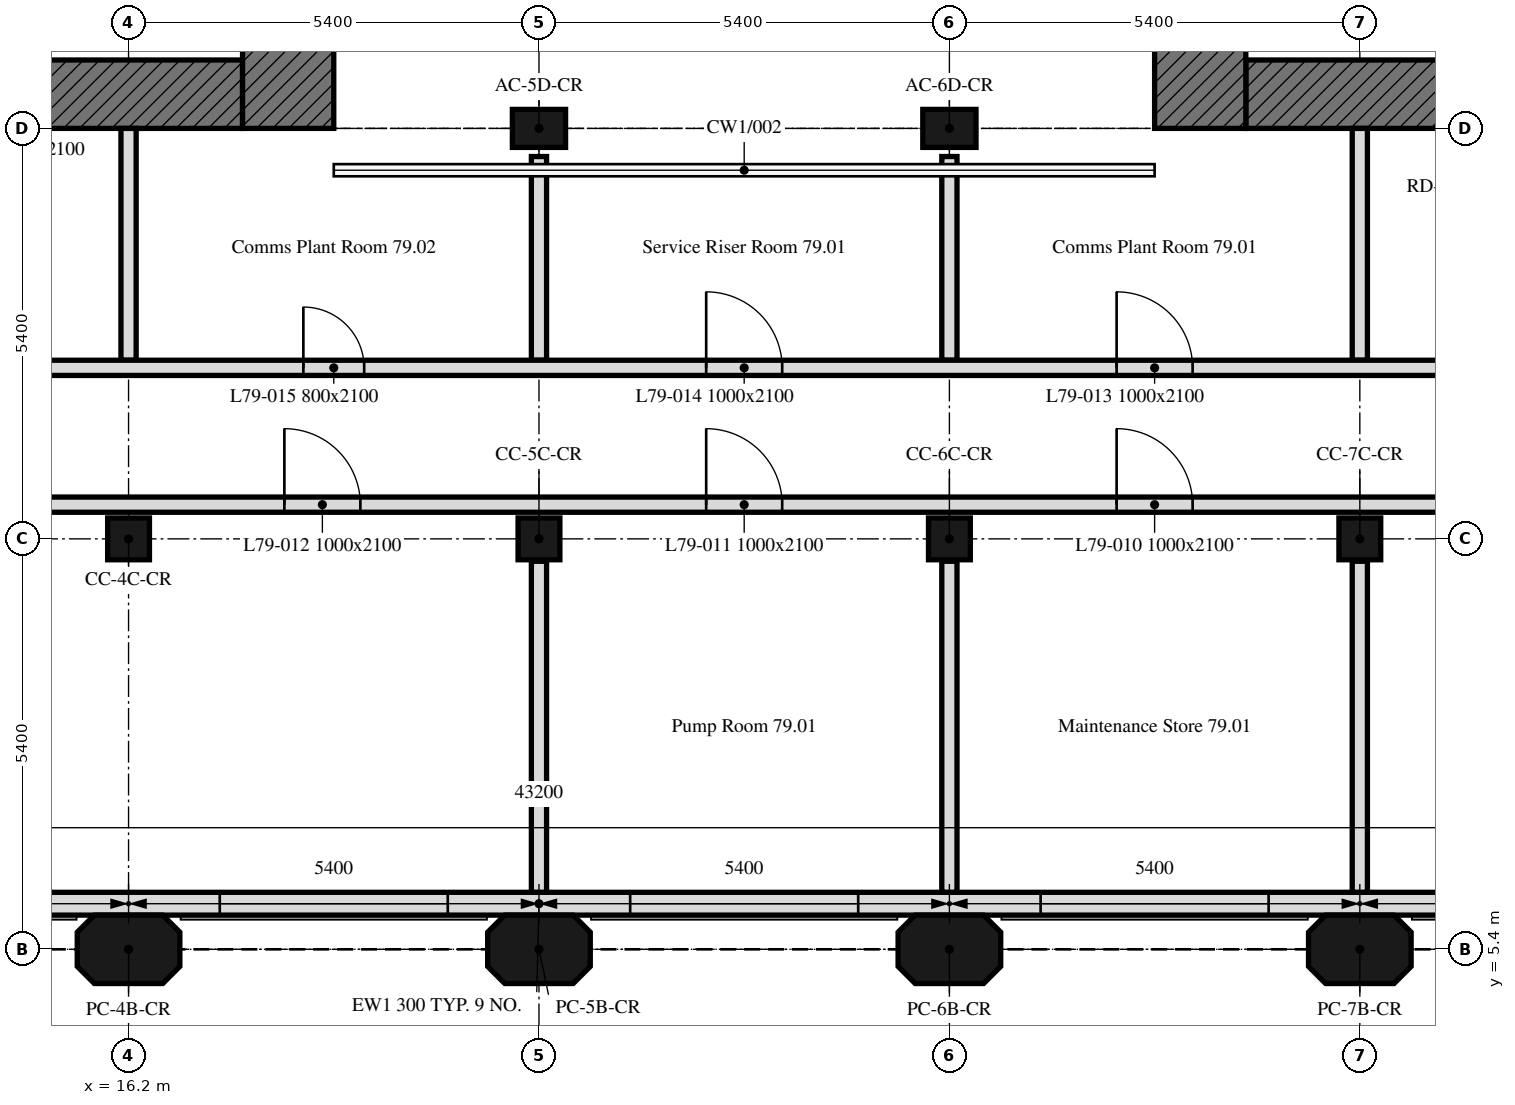
"""IFC4 building model, lengths in metres.
Left out: names, types, materials, properties, quantities, classifications, styles, units other than length and angle.
Written with IfcOpenShell. Run it as: python <this file> out.ifc"""

import sys

from ifc_helpers import new_model, si_unit, direction, frame, frame_2d, origin, origin_2d, place, context, subcontext, project, spatial, polyline, rectangle, outline, extrude, element, fill, save


model = new_model("IFC4")
c1 = context("Model", 3, precision=1e-05, world=origin(), true_north=direction((0.0, 1.0)))
c2 = subcontext(c1, "Body", "Model", "MODEL_VIEW")
j1 = project(units=[si_unit("LENGTHUNIT", "METRE"), si_unit("PLANEANGLEUNIT", "RADIAN")], contexts=[c1])
p1 = place(None, origin())
s1 = spatial("IfcSite", under=j1, at=p1, CompositionType="ELEMENT")
p2 = place(p1, origin())
s2 = spatial("IfcBuilding", under=s1, at=p2, CompositionType="ELEMENT")
p3 = place(p2, frame((0.0, 0.0, 317.2)))
s3 = spatial("IfcBuildingStorey", under=s2, at=p3, CompositionType="ELEMENT", Elevation=317.2)
for number, where, z_axis, x_axis in (
    (1, (16.2, 5.4, 0.0), (0.0, 0.0, 1.0), (1.0, 0.0, 0.0)),
    (2, (21.6, 5.4, 0.0), (0.0, 0.0, 1.0), (1.0, 0.0, 0.0)),
    (3, (27.0, 5.4, 0.0), (0.0, 0.0, 1.0), (1.0, 0.0, 0.0)),
    (4, (32.4, 5.4, 0.0), (0.0, 0.0, 1.0), (1.0, 0.0, 0.0)),
):
    element("IfcColumn", number, at=place(p3, frame(where, z_axis=z_axis, x_axis=x_axis)), inside=s3, PredefinedType="COLUMN", context=c2, shape_type="SweptSolid", body=[
        extrude(outline(polyline([(-0.45, -0.45), (0.45, -0.45), (0.675, -0.225), (0.675, 0.225), (0.45, 0.45), (-0.45, 0.45), (-0.675, 0.225), (-0.675, -0.225), (-0.45, -0.45)])), origin(), (0.0, 0.0, 1.0), 4.2),
    ])
for number, where, z_axis, x_axis in (
    (5, (16.2, 10.8, 0.0), (0.0, 0.0, 1.0), (1.0, 0.0, 0.0)),
    (6, (21.6, 10.8, 0.0), (0.0, 0.0, 1.0), (1.0, 0.0, 0.0)),
    (7, (27.0, 10.8, 0.0), (0.0, 0.0, 1.0), (1.0, 0.0, 0.0)),
    (8, (32.4, 10.8, 0.0), (0.0, 0.0, 1.0), (1.0, 0.0, 0.0)),
):
    element("IfcColumn", number, at=place(p3, frame(where, z_axis=z_axis, x_axis=x_axis)), inside=s3, PredefinedType="COLUMN", context=c2, shape_type="SweptSolid", body=[
        extrude(rectangle(XDim=0.55, YDim=0.55, at=origin_2d()), origin(), (0.0, 0.0, 1.0), 4.2),
    ])
for number, where, z_axis, x_axis in (
    (9, (21.6, 16.2, 0.0), (0.0, 0.0, 1.0), (1.0, 0.0, 0.0)),
    (10, (27.0, 16.2, 0.0), (0.0, 0.0, 1.0), (1.0, 0.0, 0.0)),
):
    element("IfcColumn", number, at=place(p3, frame(where, z_axis=z_axis, x_axis=x_axis)), inside=s3, PredefinedType="COLUMN", context=c2, shape_type="SweptSolid", body=[
        extrude(rectangle(XDim=0.7, YDim=0.5, at=origin_2d()), origin(), (0.0, 0.0, 1.0), 4.2),
    ])
p4 = place(p3, frame((5.586, 6.0, 0.0), z_axis=(0.0, 0.0, 1.0), x_axis=(1.0, 0.0, 0.0)))
e11 = element("IfcWall", 11, at=p4, inside=s3, PredefinedType="SOLIDWALL", context=c2, shape_type="SweptSolid", body=[
    extrude(outline(polyline([(0.0, 0.0), (32.027, 0.0), (32.027, 4.2), (31.434, 4.2), (30.841, 4.2), (30.248, 4.2), (29.655, 4.2), (29.062, 4.2), (28.469, 4.2), (27.875, 4.2), (27.282, 4.2), (26.689, 4.2), (26.096, 4.2), (25.503, 4.2), (24.91, 4.2), (24.317, 4.2), (23.724, 4.2), (23.131, 4.2), (22.538, 4.2), (21.945, 4.2), (21.352, 4.2), (20.758, 4.2), (20.165, 4.2), (19.572, 4.2), (18.979, 4.2), (18.386, 4.2), (17.793, 4.2), (17.2, 4.2), (16.607, 4.2), (16.014, 4.2), (15.42, 4.2), (14.827, 4.2), (14.234, 4.2), (13.641, 4.2), (13.048, 4.2), (12.455, 4.2), (11.862, 4.2), (11.269, 4.2), (10.676, 4.2), (10.083, 4.2), (9.49, 4.2), (8.896, 4.2), (8.303, 4.2), (7.71, 4.2), (7.117, 4.2), (6.524, 4.2), (5.931, 4.2), (5.338, 4.2), (4.745, 4.2), (4.152, 4.2), (3.559, 4.2), (2.966, 4.2), (2.372, 4.2), (1.779, 4.2), (1.186, 4.2), (0.593, 4.2), (0.0, 4.2), (0.0, 0.0)])), frame((0.0, 0.15, 0.0), z_axis=(0.0, -1.0, 0.0), x_axis=(1.0, 0.0, 0.0)), (0.0, 0.0, 1.0), 0.3),
])
p5 = place(p4, frame((1.014, 0.0, 0.6)))
e12 = element("IfcOpeningElement", 12, at=p5, cuts=e11, PredefinedType="OPENING", context=c2, shape_type="SweptSolid", body=[
    extrude(rectangle(XDim=3.0, YDim=1.8, at=frame_2d((1.5, 0.9))), frame((0.0, 0.16, 0.0), z_axis=(0.0, -1.0, 0.0), x_axis=(1.0, 0.0, 0.0)), (0.0, 0.0, 1.0), 0.32),
])
p6 = place(p4, frame((6.414, 0.0, 0.6)))
e13 = element("IfcOpeningElement", 13, at=p6, cuts=e11, PredefinedType="OPENING", context=c2, shape_type="SweptSolid", body=[
    extrude(rectangle(XDim=3.0, YDim=1.8, at=frame_2d((1.5, 0.9))), frame((0.0, 0.16, 0.0), z_axis=(0.0, -1.0, 0.0), x_axis=(1.0, 0.0, 0.0)), (0.0, 0.0, 1.0), 0.32),
])
p7 = place(p4, frame((11.814, 0.0, 0.6)))
e14 = element("IfcOpeningElement", 14, at=p7, cuts=e11, PredefinedType="OPENING", context=c2, shape_type="SweptSolid", body=[
    extrude(rectangle(XDim=3.0, YDim=1.8, at=frame_2d((1.5, 0.9))), frame((0.0, 0.16, 0.0), z_axis=(0.0, -1.0, 0.0), x_axis=(1.0, 0.0, 0.0)), (0.0, 0.0, 1.0), 0.32),
])
p8 = place(p4, frame((17.214, 0.0, 0.6)))
e15 = element("IfcOpeningElement", 15, at=p8, cuts=e11, PredefinedType="OPENING", context=c2, shape_type="SweptSolid", body=[
    extrude(rectangle(XDim=3.0, YDim=1.8, at=frame_2d((1.5, 0.9))), frame((0.0, 0.16, 0.0), z_axis=(0.0, -1.0, 0.0), x_axis=(1.0, 0.0, 0.0)), (0.0, 0.0, 1.0), 0.32),
])
p9 = place(p4, frame((22.614, 0.0, 0.6)))
e16 = element("IfcOpeningElement", 16, at=p9, cuts=e11, PredefinedType="OPENING", context=c2, shape_type="SweptSolid", body=[
    extrude(rectangle(XDim=3.0, YDim=1.8, at=frame_2d((1.5, 0.9))), frame((0.0, 0.16, 0.0), z_axis=(0.0, -1.0, 0.0), x_axis=(1.0, 0.0, 0.0)), (0.0, 0.0, 1.0), 0.32),
])
p10 = place(p4, frame((28.014, 0.0, 0.6)))
e17 = element("IfcOpeningElement", 17, at=p10, cuts=e11, PredefinedType="OPENING", context=c2, shape_type="SweptSolid", body=[
    extrude(rectangle(XDim=3.0, YDim=1.8, at=frame_2d((1.5, 0.9))), frame((0.0, 0.16, 0.0), z_axis=(0.0, -1.0, 0.0), x_axis=(1.0, 0.0, 0.0)), (0.0, 0.0, 1.0), 0.32),
])
p11 = place(p3, frame((17.7, 16.65, 0.0), z_axis=(0.0, 0.0, 1.0), x_axis=(-1.0, 0.0, 0.0)))
e18 = element("IfcWall", 18, at=p11, inside=s3, PredefinedType="SOLIDWALL", context=c2, shape_type="SweptSolid", body=[
    extrude(rectangle(XDim=11.1, YDim=0.9, at=frame_2d((5.55, 0.0))), origin(), (0.0, 0.0, 1.0), 4.2),
])
p12 = place(p11, frame((5.55, 0.0, 0.0)))
e19 = element("IfcOpeningElement", 19, at=p12, cuts=e18, PredefinedType="OPENING", context=c2, shape_type="SweptSolid", body=[
    extrude(rectangle(XDim=2.0, YDim=2.4, at=frame_2d((1.0, 1.2))), frame((0.0, 0.45, 0.0), z_axis=(0.0, -1.0, 0.0), x_axis=(1.0, 0.0, 0.0)), (0.0, 0.0, 1.0), 0.9),
])
p13 = place(p3, frame((18.3, 32.4, 0.0), z_axis=(0.0, 0.0, 1.0), x_axis=(0.0, -1.0, 0.0)))
e20 = element("IfcWall", 20, at=p13, inside=s3, PredefinedType="SOLIDWALL", context=c2, shape_type="SweptSolid", body=[
    extrude(rectangle(XDim=16.2, YDim=1.2, at=frame_2d((8.1, 0.0))), origin(), (0.0, 0.0, 1.0), 4.2),
])
p14 = place(p3, frame((42.0, 16.65, 0.0), z_axis=(0.0, 0.0, 1.0), x_axis=(-1.0, 0.0, 0.0)))
e21 = element("IfcWall", 21, at=p14, inside=s3, PredefinedType="SOLIDWALL", context=c2, shape_type="SweptSolid", body=[
    extrude(rectangle(XDim=11.1, YDim=0.9, at=frame_2d((5.55, 0.0))), origin(), (0.0, 0.0, 1.0), 4.2),
])
p15 = place(p14, frame((3.55, 0.0, 0.0)))
e22 = element("IfcOpeningElement", 22, at=p15, cuts=e21, PredefinedType="OPENING", context=c2, shape_type="SweptSolid", body=[
    extrude(rectangle(XDim=2.0, YDim=2.4, at=frame_2d((1.0, 1.2))), frame((0.0, 0.45, 0.0), z_axis=(0.0, -1.0, 0.0), x_axis=(1.0, 0.0, 0.0)), (0.0, 0.0, 1.0), 0.9),
])
p16 = place(p3, frame((30.3, 16.2, 0.0), z_axis=(0.0, 0.0, 1.0), x_axis=(0.0, 1.0, 0.0)))
e23 = element("IfcWall", 23, at=p16, inside=s3, PredefinedType="SOLIDWALL", context=c2, shape_type="SweptSolid", body=[
    extrude(rectangle(XDim=16.2, YDim=1.2, at=frame_2d((8.1, 0.0))), origin(), (0.0, 0.0, 1.0), 4.2),
])
for number, where, z_axis, x_axis in (
    (24, (32.4, 10.505, 0.0), (0.0, 0.0, 1.0), (0.0, -1.0, 0.0)),
    (25, (27.0, 10.505, 0.0), (0.0, 0.0, 1.0), (0.0, -1.0, 0.0)),
    (26, (21.6, 10.505, 0.0), (0.0, 0.0, 1.0), (0.0, -1.0, 0.0)),
):
    element("IfcWall", number, at=place(p3, frame(where, z_axis=z_axis, x_axis=x_axis)), inside=s3, PredefinedType="PARTITIONING", context=c2, shape_type="SweptSolid", body=[
        extrude(rectangle(XDim=4.354, YDim=0.2, at=frame_2d((2.177, 0.0))), origin(), (0.0, 0.0, 1.0), 4.2),
    ])
p17 = place(p3, frame((0.751, 11.25, 0.0), z_axis=(0.0, 0.0, 1.0), x_axis=(1.0, 0.0, 0.0)))
e27 = element("IfcWall", 27, at=p17, inside=s3, PredefinedType="PARTITIONING", context=c2, shape_type="SweptSolid", body=[
    extrude(rectangle(XDim=41.698, YDim=0.2, at=frame_2d((20.849, 0.0))), origin(), (0.0, 0.0, 1.0), 4.2),
])
p18 = place(p17, frame((33.866, 0.0, 0.0)))
e28 = element("IfcOpeningElement", 28, at=p18, cuts=e27, PredefinedType="OPENING", context=c2, shape_type="SweptSolid", body=[
    extrude(rectangle(XDim=1.0, YDim=2.1, at=frame_2d((0.5, 1.05))), frame((0.0, 0.1, 0.0), z_axis=(0.0, -1.0, 0.0), x_axis=(1.0, 0.0, 0.0)), (0.0, 0.0, 1.0), 0.2),
])
p19 = place(p17, frame((28.449, 0.0, 0.0)))
e29 = element("IfcOpeningElement", 29, at=p19, cuts=e27, PredefinedType="OPENING", context=c2, shape_type="SweptSolid", body=[
    extrude(rectangle(XDim=1.0, YDim=2.1, at=frame_2d((0.5, 1.05))), frame((0.0, 0.1, 0.0), z_axis=(0.0, -1.0, 0.0), x_axis=(1.0, 0.0, 0.0)), (0.0, 0.0, 1.0), 0.2),
])
p20 = place(p17, frame((23.049, 0.0, 0.0)))
e30 = element("IfcOpeningElement", 30, at=p20, cuts=e27, PredefinedType="OPENING", context=c2, shape_type="SweptSolid", body=[
    extrude(rectangle(XDim=1.0, YDim=2.1, at=frame_2d((0.5, 1.05))), frame((0.0, 0.1, 0.0), z_axis=(0.0, -1.0, 0.0), x_axis=(1.0, 0.0, 0.0)), (0.0, 0.0, 1.0), 0.2),
])
p21 = place(p17, frame((17.499, 0.0, 0.0)))
e31 = element("IfcOpeningElement", 31, at=p21, cuts=e27, PredefinedType="OPENING", context=c2, shape_type="SweptSolid", body=[
    extrude(rectangle(XDim=1.0, YDim=2.1, at=frame_2d((0.5, 1.05))), frame((0.0, 0.1, 0.0), z_axis=(0.0, -1.0, 0.0), x_axis=(1.0, 0.0, 0.0)), (0.0, 0.0, 1.0), 0.2),
])
p22 = place(p3, frame((27.0, 15.83, 0.0), z_axis=(0.0, 0.0, 1.0), x_axis=(0.0, -1.0, 0.0)))
e32 = element("IfcWall", 32, at=p22, inside=s3, PredefinedType="PARTITIONING", context=c2, shape_type="SweptSolid", body=[
    extrude(rectangle(XDim=2.68, YDim=0.2, at=frame_2d((1.34, 0.0))), origin(), (0.0, 0.0, 1.0), 4.2),
])
p23 = place(p3, frame((32.4, 13.15, 0.0), z_axis=(0.0, 0.0, 1.0), x_axis=(0.0, 1.0, 0.0)))
e33 = element("IfcWall", 33, at=p23, inside=s3, PredefinedType="PARTITIONING", context=c2, shape_type="SweptSolid", body=[
    extrude(rectangle(XDim=3.05, YDim=0.2, at=frame_2d((1.525, 0.0))), origin(), (0.0, 0.0, 1.0), 4.2),
])
p24 = place(p3, frame((21.6, 15.83, 0.0), z_axis=(0.0, 0.0, 1.0), x_axis=(0.0, -1.0, 0.0)))
e34 = element("IfcWall", 34, at=p24, inside=s3, PredefinedType="PARTITIONING", context=c2, shape_type="SweptSolid", body=[
    extrude(rectangle(XDim=2.68, YDim=0.2, at=frame_2d((1.34, 0.0))), origin(), (0.0, 0.0, 1.0), 4.2),
])
p25 = place(p3, frame((16.2, 16.2, 0.0), z_axis=(0.0, 0.0, 1.0), x_axis=(0.0, -1.0, 0.0)))
e35 = element("IfcWall", 35, at=p25, inside=s3, PredefinedType="PARTITIONING", context=c2, shape_type="SweptSolid", body=[
    extrude(rectangle(XDim=3.05, YDim=0.2, at=frame_2d((1.525, 0.0))), origin(), (0.0, 0.0, 1.0), 4.2),
])
p26 = place(p3, frame((5.3, 13.05, 0.0), z_axis=(0.0, 0.0, 1.0), x_axis=(1.0, 0.0, 0.0)))
e36 = element("IfcWall", 36, at=p26, inside=s3, PredefinedType="PARTITIONING", context=c2, shape_type="SweptSolid", body=[
    extrude(rectangle(XDim=36.049, YDim=0.2, at=frame_2d((18.024, 0.0))), origin(), (0.0, 0.0, 1.0), 4.2),
])
p27 = place(p26, frame((23.9, 0.0, 0.0)))
e37 = element("IfcOpeningElement", 37, at=p27, cuts=e36, PredefinedType="OPENING", context=c2, shape_type="SweptSolid", body=[
    extrude(rectangle(XDim=1.0, YDim=2.1, at=frame_2d((0.5, 1.05))), frame((0.0, 0.1, 0.0), z_axis=(0.0, -1.0, 0.0), x_axis=(1.0, 0.0, 0.0)), (0.0, 0.0, 1.0), 0.2),
])
p28 = place(p26, frame((18.5, 0.0, 0.0)))
e38 = element("IfcOpeningElement", 38, at=p28, cuts=e36, PredefinedType="OPENING", context=c2, shape_type="SweptSolid", body=[
    extrude(rectangle(XDim=1.0, YDim=2.1, at=frame_2d((0.5, 1.05))), frame((0.0, 0.1, 0.0), z_axis=(0.0, -1.0, 0.0), x_axis=(1.0, 0.0, 0.0)), (0.0, 0.0, 1.0), 0.2),
])
p29 = place(p26, frame((13.2, 0.0, 0.0)))
e39 = element("IfcOpeningElement", 39, at=p29, cuts=e36, PredefinedType="OPENING", context=c2, shape_type="SweptSolid", body=[
    extrude(rectangle(XDim=0.8, YDim=2.1, at=frame_2d((0.4, 1.05))), frame((0.0, 0.1, 0.0), z_axis=(0.0, -1.0, 0.0), x_axis=(1.0, 0.0, 0.0)), (0.0, 0.0, 1.0), 0.2),
])
p30 = place(p26, frame((29.5, 0.0, 0.0)))
e40 = element("IfcOpeningElement", 40, at=p30, cuts=e36, PredefinedType="OPENING", context=c2, shape_type="SweptSolid", body=[
    extrude(rectangle(XDim=1.8, YDim=2.4, at=frame_2d((0.9, 1.2))), frame((0.0, 0.1, 0.0), z_axis=(0.0, -1.0, 0.0), x_axis=(1.0, 0.0, 0.0)), (0.0, 0.0, 1.0), 0.2),
])
p31 = place(p26, frame((2.5, 0.0, 0.0)))
e41 = element("IfcOpeningElement", 41, at=p31, cuts=e36, PredefinedType="OPENING", context=c2, shape_type="SweptSolid", body=[
    extrude(rectangle(XDim=1.8, YDim=2.4, at=frame_2d((0.9, 1.2))), frame((0.0, 0.1, 0.0), z_axis=(0.0, -1.0, 0.0), x_axis=(1.0, 0.0, 0.0)), (0.0, 0.0, 1.0), 0.2),
])
p32 = place(p7, origin())
e42 = element("IfcWindow", 42, at=p32, inside=s3, PartitioningType="SINGLE_PANEL", PredefinedType="WINDOW", context=c2, shape_type="SweptSolid", body=[
    extrude(rectangle(XDim=3.0, YDim=1.8, at=frame_2d((1.5, 0.9))), frame((0.0, 0.03, 0.0), z_axis=(0.0, -1.0, 0.0), x_axis=(1.0, 0.0, 0.0)), (0.0, 0.0, 1.0), 0.06),
])
fill(e14, e42)
p33 = place(p8, origin())
e43 = element("IfcWindow", 43, at=p33, inside=s3, PartitioningType="SINGLE_PANEL", PredefinedType="WINDOW", context=c2, shape_type="SweptSolid", body=[
    extrude(rectangle(XDim=3.0, YDim=1.8, at=frame_2d((1.5, 0.9))), frame((0.0, 0.03, 0.0), z_axis=(0.0, -1.0, 0.0), x_axis=(1.0, 0.0, 0.0)), (0.0, 0.0, 1.0), 0.06),
])
fill(e15, e43)
p34 = place(p9, origin())
e44 = element("IfcWindow", 44, at=p34, inside=s3, PartitioningType="SINGLE_PANEL", PredefinedType="WINDOW", context=c2, shape_type="SweptSolid", body=[
    extrude(rectangle(XDim=3.0, YDim=1.8, at=frame_2d((1.5, 0.9))), frame((0.0, 0.03, 0.0), z_axis=(0.0, -1.0, 0.0), x_axis=(1.0, 0.0, 0.0)), (0.0, 0.0, 1.0), 0.06),
])
fill(e16, e44)
p35 = place(p19, origin())
e45 = element("IfcDoor", 45, at=p35, inside=s3, OperationType="SINGLE_SWING_LEFT", PredefinedType="DOOR", context=c2, shape_type="SweptSolid", body=[
    extrude(rectangle(XDim=1.0, YDim=2.1, at=frame_2d((0.5, 1.05))), frame((0.0, 0.025, 0.0), z_axis=(0.0, -1.0, 0.0), x_axis=(1.0, 0.0, 0.0)), (0.0, 0.0, 1.0), 0.05),
])
fill(e29, e45)
p36 = place(p20, origin())
e46 = element("IfcDoor", 46, at=p36, inside=s3, OperationType="SINGLE_SWING_LEFT", PredefinedType="DOOR", context=c2, shape_type="SweptSolid", body=[
    extrude(rectangle(XDim=1.0, YDim=2.1, at=frame_2d((0.5, 1.05))), frame((0.0, 0.025, 0.0), z_axis=(0.0, -1.0, 0.0), x_axis=(1.0, 0.0, 0.0)), (0.0, 0.0, 1.0), 0.05),
])
fill(e30, e46)
p37 = place(p21, origin())
e47 = element("IfcDoor", 47, at=p37, inside=s3, OperationType="SINGLE_SWING_RIGHT", PredefinedType="DOOR", context=c2, shape_type="SweptSolid", body=[
    extrude(rectangle(XDim=1.0, YDim=2.1, at=frame_2d((0.5, 1.05))), frame((0.0, 0.025, 0.0), z_axis=(0.0, -1.0, 0.0), x_axis=(1.0, 0.0, 0.0)), (0.0, 0.0, 1.0), 0.05),
])
fill(e31, e47)
p38 = place(p27, origin())
e48 = element("IfcDoor", 48, at=p38, inside=s3, OperationType="SINGLE_SWING_RIGHT", PredefinedType="DOOR", context=c2, shape_type="SweptSolid", body=[
    extrude(rectangle(XDim=1.0, YDim=2.1, at=frame_2d((0.5, 1.05))), frame((0.0, 0.025, 0.0), z_axis=(0.0, -1.0, 0.0), x_axis=(1.0, 0.0, 0.0)), (0.0, 0.0, 1.0), 0.05),
])
fill(e37, e48)
p39 = place(p28, origin())
e49 = element("IfcDoor", 49, at=p39, inside=s3, OperationType="SINGLE_SWING_LEFT", PredefinedType="DOOR", context=c2, shape_type="SweptSolid", body=[
    extrude(rectangle(XDim=1.0, YDim=2.1, at=frame_2d((0.5, 1.05))), frame((0.0, 0.025, 0.0), z_axis=(0.0, -1.0, 0.0), x_axis=(1.0, 0.0, 0.0)), (0.0, 0.0, 1.0), 0.05),
])
fill(e38, e49)
p40 = place(p29, origin())
e50 = element("IfcDoor", 50, at=p40, inside=s3, OperationType="SINGLE_SWING_LEFT", PredefinedType="DOOR", context=c2, shape_type="SweptSolid", body=[
    extrude(rectangle(XDim=0.8, YDim=2.1, at=frame_2d((0.4, 1.05))), frame((0.0, 0.025, 0.0), z_axis=(0.0, -1.0, 0.0), x_axis=(1.0, 0.0, 0.0)), (0.0, 0.0, 1.0), 0.05),
])
fill(e39, e50)
save(model, sys.argv[1])
